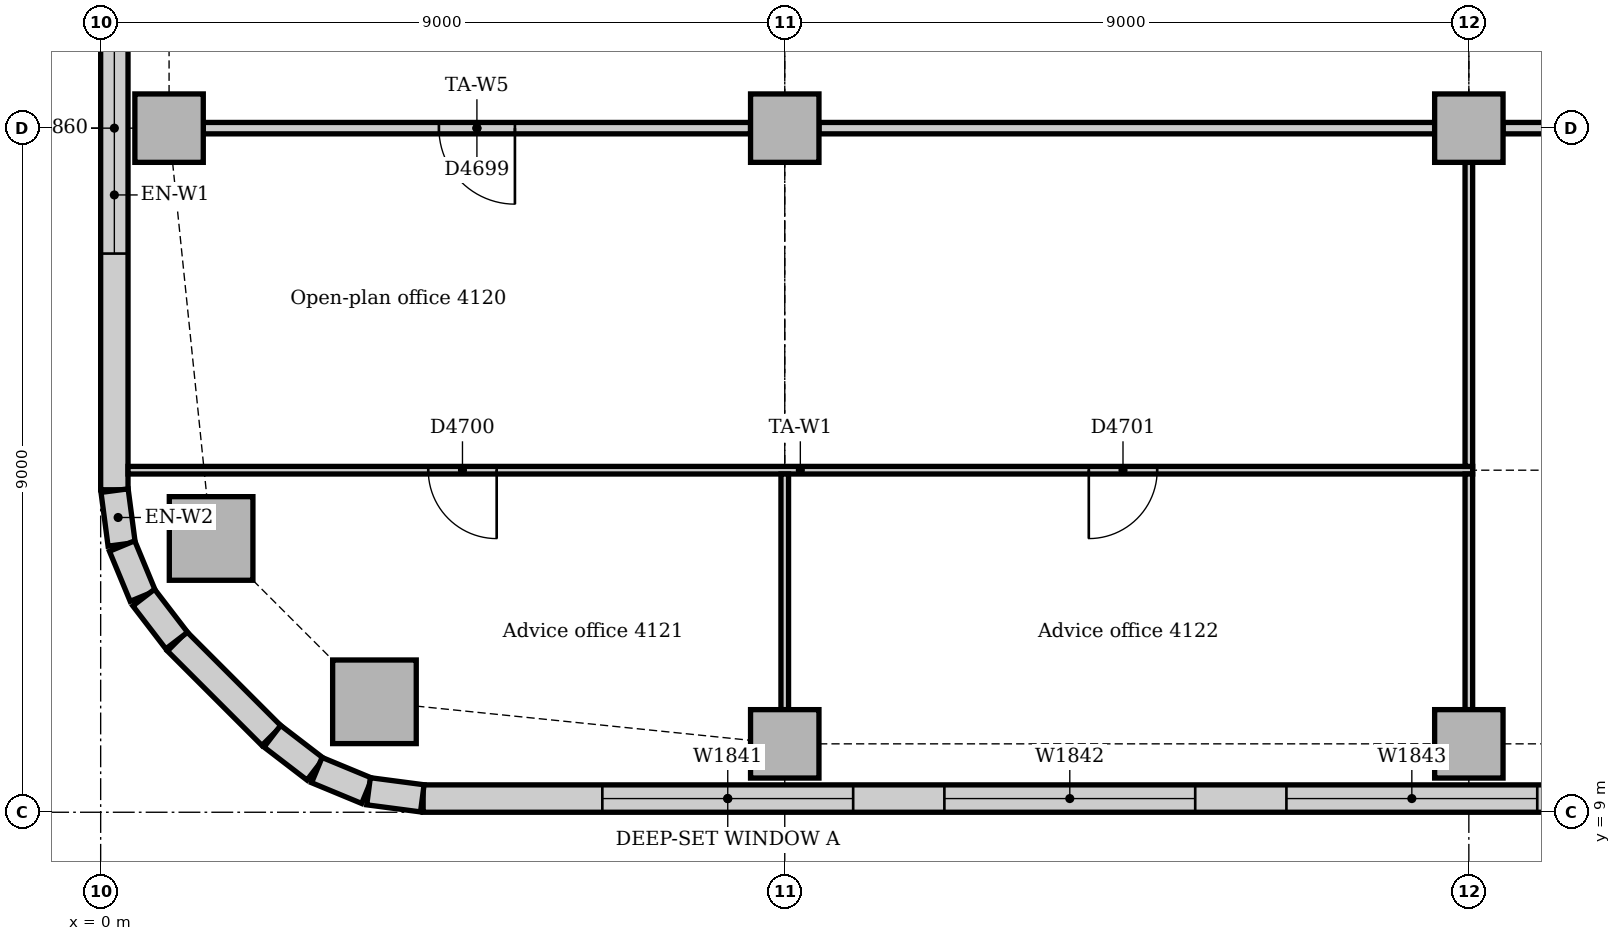
"""IFC4 building model, lengths in metres.
Left out: names, types, materials, properties, quantities, classifications, styles, units other than length and angle.
Written with IfcOpenShell. Run it as: python <this file> out.ifc"""

import sys

from ifc_helpers import new_model, si_unit, direction, frame, frame_2d, origin, origin_2d, place, context, subcontext, project, spatial, rectangle, extrude, element, fill, save


model = new_model("IFC4")
c1 = context("Model", 3, precision=1e-05, world=origin(), true_north=direction((0.0, 1.0)))
c2 = subcontext(c1, "Body", "Model", "MODEL_VIEW")
j1 = project(units=[si_unit("LENGTHUNIT", "METRE"), si_unit("PLANEANGLEUNIT", "RADIAN")], contexts=[c1])
p1 = place(None, origin())
s1 = spatial("IfcSite", under=j1, at=p1, CompositionType="ELEMENT")
p2 = place(p1, origin())
s2 = spatial("IfcBuilding", under=s1, at=p2, CompositionType="ELEMENT")
p3 = place(p2, frame((0.0, 0.0, 173.0)))
s3 = spatial("IfcBuildingStorey", under=s2, at=p3, CompositionType="ELEMENT", Elevation=173.0)
for number, where, z_axis, x_axis in (
    (1, (3.602, 10.453, 0.0), (0.0, 0.0, 1.0), (1.0, 0.0, 0.0)),
    (2, (1.453, 12.602, 0.0), (0.0, 0.0, 1.0), (1.0, 0.0, 0.0)),
):
    element("IfcColumn", number, at=place(p3, frame(where, z_axis=z_axis, x_axis=x_axis)), inside=s3, PredefinedType="COLUMN", context=c2, shape_type="SweptSolid", body=[
        extrude(rectangle(XDim=1.1, YDim=1.1, at=origin_2d()), origin(), (0.0, 0.0, 1.0), 3.85),
    ])
for number, where, z_axis, x_axis in (
    (3, (9.0, 9.9, 0.0), (0.0, 0.0, 1.0), (1.0, 0.0, 0.0)),
    (4, (18.0, 9.9, 0.0), (0.0, 0.0, 1.0), (1.0, 0.0, 0.0)),
    (5, (0.9, 18.0, 0.0), (0.0, 0.0, 1.0), (1.0, 0.0, 0.0)),
    (6, (9.0, 18.0, 0.0), (0.0, 0.0, 1.0), (1.0, 0.0, 0.0)),
    (7, (18.0, 18.0, 0.0), (0.0, 0.0, 1.0), (1.0, 0.0, 0.0)),
):
    element("IfcColumn", number, at=place(p3, frame(where, z_axis=z_axis, x_axis=x_axis)), inside=s3, PredefinedType="COLUMN", context=c2, shape_type="SweptSolid", body=[
        extrude(rectangle(XDim=0.9, YDim=0.9, at=origin_2d()), origin(), (0.0, 0.0, 1.0), 3.85),
    ])
p4 = place(p3, frame((4.243, 9.18, 0.0), z_axis=(0.0, 0.0, 1.0), x_axis=(1.0, 0.0, 0.0)))
e8 = element("IfcWall", 8, at=p4, inside=s3, PredefinedType="STANDARD", context=c2, shape_type="SweptSolid", body=[
    extrude(rectangle(XDim=30.515, YDim=0.36, at=frame_2d((15.257, 0.0))), origin(), (0.0, 0.0, 1.0), 3.85),
])
p5 = place(p4, frame((2.357, 0.0, 0.9)))
e9 = element("IfcOpeningElement", 9, at=p5, cuts=e8, PredefinedType="OPENING", context=c2, shape_type="SweptSolid", body=[
    extrude(rectangle(XDim=3.3, YDim=1.6, at=frame_2d((1.65, 0.8))), frame((0.0, 0.19, 0.0), z_axis=(0.0, -1.0, 0.0), x_axis=(1.0, 0.0, 0.0)), (0.0, 0.0, 1.0), 0.38),
])
p6 = place(p4, frame((6.857, 0.0, 0.9)))
e10 = element("IfcOpeningElement", 10, at=p6, cuts=e8, PredefinedType="OPENING", context=c2, shape_type="SweptSolid", body=[
    extrude(rectangle(XDim=3.3, YDim=1.6, at=frame_2d((1.65, 0.8))), frame((0.0, 0.19, 0.0), z_axis=(0.0, -1.0, 0.0), x_axis=(1.0, 0.0, 0.0)), (0.0, 0.0, 1.0), 0.38),
])
p7 = place(p4, frame((11.357, 0.0, 0.9)))
e11 = element("IfcOpeningElement", 11, at=p7, cuts=e8, PredefinedType="OPENING", context=c2, shape_type="SweptSolid", body=[
    extrude(rectangle(XDim=3.3, YDim=1.6, at=frame_2d((1.65, 0.8))), frame((0.0, 0.19, 0.0), z_axis=(0.0, -1.0, 0.0), x_axis=(1.0, 0.0, 0.0)), (0.0, 0.0, 1.0), 0.38),
])
p8 = place(p4, frame((15.857, 0.0, 0.9)))
e12 = element("IfcOpeningElement", 12, at=p8, cuts=e8, PredefinedType="OPENING", context=c2, shape_type="SweptSolid", body=[
    extrude(rectangle(XDim=3.3, YDim=1.6, at=frame_2d((1.65, 0.8))), frame((0.0, 0.19, 0.0), z_axis=(0.0, -1.0, 0.0), x_axis=(1.0, 0.0, 0.0)), (0.0, 0.0, 1.0), 0.38),
])
p9 = place(p4, frame((20.357, 0.0, 0.9)))
e13 = element("IfcOpeningElement", 13, at=p9, cuts=e8, PredefinedType="OPENING", context=c2, shape_type="SweptSolid", body=[
    extrude(rectangle(XDim=3.3, YDim=1.6, at=frame_2d((1.65, 0.8))), frame((0.0, 0.19, 0.0), z_axis=(0.0, -1.0, 0.0), x_axis=(1.0, 0.0, 0.0)), (0.0, 0.0, 1.0), 0.38),
])
p10 = place(p4, frame((25.307, 0.0, 0.9)))
e14 = element("IfcOpeningElement", 14, at=p10, cuts=e8, PredefinedType="OPENING", context=c2, shape_type="SweptSolid", body=[
    extrude(rectangle(XDim=1.8, YDim=1.6, at=frame_2d((0.9, 0.8))), frame((0.0, 0.19, 0.0), z_axis=(0.0, -1.0, 0.0), x_axis=(1.0, 0.0, 0.0)), (0.0, 0.0, 1.0), 0.38),
])
p11 = place(p3, frame((0.18, 21.0, 0.0), z_axis=(0.0, 0.0, 1.0), x_axis=(0.0, -1.0, 0.0)))
e15 = element("IfcWall", 15, at=p11, inside=s3, PredefinedType="STANDARD", context=c2, shape_type="SweptSolid", body=[
    extrude(rectangle(XDim=7.757, YDim=0.36, at=frame_2d((3.879, 0.0))), origin(), (0.0, 0.0, 1.0), 3.85),
])
p12 = place(p11, frame((1.35, 0.0, 0.9)))
e16 = element("IfcOpeningElement", 16, at=p12, cuts=e15, PredefinedType="OPENING", context=c2, shape_type="SweptSolid", body=[
    extrude(rectangle(XDim=3.3, YDim=1.6, at=frame_2d((1.65, 0.8))), frame((0.0, 0.19, 0.0), z_axis=(0.0, -1.0, 0.0), x_axis=(1.0, 0.0, 0.0)), (0.0, 0.0, 1.0), 0.38),
])
p13 = place(p3, frame((1.006, 11.249, 0.0), z_axis=(0.0, 0.0, 1.0), x_axis=(0.707106781187, -0.707106781187, 0.0)))
e17 = element("IfcWall", 17, at=p13, inside=s3, PredefinedType="STANDARD", context=c2, shape_type="SweptSolid", body=[
    extrude(rectangle(XDim=1.757, YDim=0.36, at=frame_2d((0.879, 0.0))), origin(), (0.0, 0.0, 1.0), 3.85),
])
for number, where, z_axis, x_axis in (
    (18, (0.183, 13.231, 0.0), (0.0, 0.0, 1.0), (0.131, -0.991, 0.0)),
    (19, (0.282, 12.503, 0.0), (0.0, 0.0, 1.0), (0.383, -0.924, 0.0)),
):
    element("IfcWall", number, at=place(p3, frame(where, z_axis=z_axis, x_axis=x_axis)), inside=s3, PredefinedType="STANDARD", context=c2, shape_type="SweptSolid", body=[
        extrude(rectangle(XDim=0.713, YDim=0.36, at=frame_2d((0.356, 0.0))), origin(), (0.0, 0.0, 1.0), 3.85),
    ])
for number, where, z_axis, x_axis in (
    (20, (0.566, 11.825, 0.0), (0.0, 0.0, 1.0), (0.609, -0.793, 0.0)),
    (21, (2.259, 10.0, 0.0), (0.0, 0.0, 1.0), (0.793, -0.609, 0.0)),
):
    element("IfcWall", number, at=place(p3, frame(where, z_axis=z_axis, x_axis=x_axis)), inside=s3, PredefinedType="STANDARD", context=c2, shape_type="SweptSolid", body=[
        extrude(rectangle(XDim=0.713, YDim=0.36, at=frame_2d((0.357, 0.0))), origin(), (0.0, 0.0, 1.0), 3.85),
    ])
for number, where, z_axis, x_axis in (
    (22, (2.844, 9.555, 0.0), (0.0, 0.0, 1.0), (0.924, -0.383, 0.0)),
    (23, (3.524, 9.276, 0.0), (0.0, 0.0, 1.0), (0.991, -0.131, 0.0)),
):
    element("IfcWall", number, at=place(p3, frame(where, z_axis=z_axis, x_axis=x_axis)), inside=s3, PredefinedType="STANDARD", context=c2, shape_type="SweptSolid", body=[
        extrude(rectangle(XDim=0.713, YDim=0.36, at=frame_2d((0.356, 0.0))), origin(), (0.0, 0.0, 1.0), 3.85),
    ])
p14 = place(p3, frame((1.35, 18.0, 0.0), z_axis=(0.0, 0.0, 1.0), x_axis=(1.0, 0.0, 0.0)))
e24 = element("IfcWall", 24, at=p14, inside=s3, PredefinedType="PARTITIONING", context=c2, shape_type="SweptSolid", body=[
    extrude(rectangle(XDim=7.2, YDim=0.15, at=frame_2d((3.6, 0.0))), origin(), (0.0, 0.0, 1.0), 3.262),
])
p15 = place(p14, frame((3.1, 0.0, 0.0)))
e25 = element("IfcOpeningElement", 25, at=p15, cuts=e24, PredefinedType="OPENING", context=c2, shape_type="SweptSolid", body=[
    extrude(rectangle(XDim=1.0, YDim=2.1, at=frame_2d((0.5, 1.05))), frame((0.0, 0.085, 0.0), z_axis=(0.0, -1.0, 0.0), x_axis=(1.0, 0.0, 0.0)), (0.0, 0.0, 1.0), 0.17),
])
p16 = place(p3, frame((9.45, 18.0, 0.0), z_axis=(0.0, 0.0, 1.0), x_axis=(1.0, 0.0, 0.0)))
e26 = element("IfcWall", 26, at=p16, inside=s3, PredefinedType="PARTITIONING", context=c2, shape_type="SweptSolid", body=[
    extrude(rectangle(XDim=8.1, YDim=0.15, at=frame_2d((4.05, 0.0))), origin(), (0.0, 0.0, 1.0), 3.262),
])
p17 = place(p3, frame((18.45, 18.0, 0.0), z_axis=(0.0, 0.0, 1.0), x_axis=(1.0, 0.0, 0.0)))
e27 = element("IfcWall", 27, at=p17, inside=s3, PredefinedType="PARTITIONING", context=c2, shape_type="SweptSolid", body=[
    extrude(rectangle(XDim=8.1, YDim=0.15, at=frame_2d((4.05, 0.0))), origin(), (0.0, 0.0, 1.0), 3.262),
])
p18 = place(p17, frame((3.6, 0.0, 0.0)))
e28 = element("IfcOpeningElement", 28, at=p18, cuts=e27, PredefinedType="OPENING", context=c2, shape_type="SweptSolid", body=[
    extrude(rectangle(XDim=0.9, YDim=2.1, at=frame_2d((0.45, 1.05))), frame((0.0, 0.085, 0.0), z_axis=(0.0, -1.0, 0.0), x_axis=(1.0, 0.0, 0.0)), (0.0, 0.0, 1.0), 0.17),
])
p19 = place(p3, frame((0.36, 13.5, 0.0), z_axis=(0.0, 0.0, 1.0), x_axis=(1.0, 0.0, 0.0)))
e29 = element("IfcWall", 29, at=p19, inside=s3, PredefinedType="PARTITIONING", context=c2, shape_type="SweptSolid", body=[
    extrude(rectangle(XDim=17.69, YDim=0.1, at=frame_2d((8.845, 0.0))), origin(), (0.0, 0.0, 1.0), 3.4),
])
p20 = place(p19, frame((3.95, 0.0, 0.0)))
e30 = element("IfcOpeningElement", 30, at=p20, cuts=e29, PredefinedType="OPENING", context=c2, shape_type="SweptSolid", body=[
    extrude(rectangle(XDim=0.9, YDim=2.1, at=frame_2d((0.45, 1.05))), frame((0.0, 0.06, 0.0), z_axis=(0.0, -1.0, 0.0), x_axis=(1.0, 0.0, 0.0)), (0.0, 0.0, 1.0), 0.12),
])
p21 = place(p19, frame((12.64, 0.0, 0.0)))
e31 = element("IfcOpeningElement", 31, at=p21, cuts=e29, PredefinedType="OPENING", context=c2, shape_type="SweptSolid", body=[
    extrude(rectangle(XDim=0.9, YDim=2.1, at=frame_2d((0.45, 1.05))), frame((0.0, 0.06, 0.0), z_axis=(0.0, -1.0, 0.0), x_axis=(1.0, 0.0, 0.0)), (0.0, 0.0, 1.0), 0.12),
])
p22 = place(p3, frame((18.0, 10.35, 0.0), z_axis=(0.0, 0.0, 1.0), x_axis=(0.0, 1.0, 0.0)))
e32 = element("IfcWall", 32, at=p22, inside=s3, PredefinedType="PARTITIONING", context=c2, shape_type="SweptSolid", body=[
    extrude(rectangle(XDim=3.1, YDim=0.1, at=frame_2d((1.55, 0.0))), origin(), (0.0, 0.0, 1.0), 3.362),
])
p23 = place(p3, frame((18.0, 13.55, 0.0), z_axis=(0.0, 0.0, 1.0), x_axis=(0.0, 1.0, 0.0)))
e33 = element("IfcWall", 33, at=p23, inside=s3, PredefinedType="PARTITIONING", context=c2, shape_type="SweptSolid", body=[
    extrude(rectangle(XDim=4.0, YDim=0.1, at=frame_2d((2.0, 0.0))), origin(), (0.0, 0.0, 1.0), 3.362),
])
p24 = place(p3, frame((9.0, 10.35, 0.0), z_axis=(0.0, 0.0, 1.0), x_axis=(0.0, 1.0, 0.0)))
e34 = element("IfcWall", 34, at=p24, inside=s3, PredefinedType="PARTITIONING", context=c2, shape_type="SweptSolid", body=[
    extrude(rectangle(XDim=3.1, YDim=0.1, at=frame_2d((1.55, 0.0))), origin(), (0.0, 0.0, 1.0), 3.362),
])
p25 = place(p5, origin())
e35 = element("IfcWindow", 35, at=p25, inside=s3, PartitioningType="SINGLE_PANEL", PredefinedType="WINDOW", context=c2, shape_type="SweptSolid", body=[
    extrude(rectangle(XDim=3.3, YDim=1.6, at=frame_2d((1.65, 0.8))), frame((0.0, 0.13, 0.0), z_axis=(0.0, -1.0, 0.0), x_axis=(1.0, 0.0, 0.0)), (0.0, 0.0, 1.0), 0.06),
])
fill(e9, e35)
p26 = place(p6, origin())
e36 = element("IfcWindow", 36, at=p26, inside=s3, PartitioningType="SINGLE_PANEL", PredefinedType="WINDOW", context=c2, shape_type="SweptSolid", body=[
    extrude(rectangle(XDim=3.3, YDim=1.6, at=frame_2d((1.65, 0.8))), frame((0.0, 0.13, 0.0), z_axis=(0.0, -1.0, 0.0), x_axis=(1.0, 0.0, 0.0)), (0.0, 0.0, 1.0), 0.06),
])
fill(e10, e36)
p27 = place(p7, origin())
e37 = element("IfcWindow", 37, at=p27, inside=s3, PartitioningType="SINGLE_PANEL", PredefinedType="WINDOW", context=c2, shape_type="SweptSolid", body=[
    extrude(rectangle(XDim=3.3, YDim=1.6, at=frame_2d((1.65, 0.8))), frame((0.0, 0.13, 0.0), z_axis=(0.0, -1.0, 0.0), x_axis=(1.0, 0.0, 0.0)), (0.0, 0.0, 1.0), 0.06),
])
fill(e11, e37)
p28 = place(p12, origin())
e38 = element("IfcWindow", 38, at=p28, inside=s3, PartitioningType="SINGLE_PANEL", PredefinedType="WINDOW", context=c2, shape_type="SweptSolid", body=[
    extrude(rectangle(XDim=3.3, YDim=1.6, at=frame_2d((1.65, 0.8))), frame((0.0, 0.13, 0.0), z_axis=(0.0, -1.0, 0.0), x_axis=(1.0, 0.0, 0.0)), (0.0, 0.0, 1.0), 0.06),
])
fill(e16, e38)
p29 = place(p15, frame((1.0, 0.0, 0.0), z_axis=(0.0, 0.0, 1.0), x_axis=(-1.0, 0.0, 0.0)))
e39 = element("IfcDoor", 39, at=p29, inside=s3, OperationType="SINGLE_SWING_LEFT", PredefinedType="DOOR", context=c2, shape_type="SweptSolid", body=[
    extrude(rectangle(XDim=1.0, YDim=2.1, at=frame_2d((0.5, 1.05))), frame((0.0, 0.025, 0.0), z_axis=(0.0, -1.0, 0.0), x_axis=(1.0, 0.0, 0.0)), (0.0, 0.0, 1.0), 0.05),
])
fill(e25, e39)
p30 = place(p20, frame((0.9, 0.0, 0.0), z_axis=(0.0, 0.0, 1.0), x_axis=(-1.0, 0.0, 0.0)))
e40 = element("IfcDoor", 40, at=p30, inside=s3, OperationType="SINGLE_SWING_LEFT", PredefinedType="DOOR", context=c2, shape_type="SweptSolid", body=[
    extrude(rectangle(XDim=0.9, YDim=2.1, at=frame_2d((0.45, 1.05))), frame((0.0, 0.025, 0.0), z_axis=(0.0, -1.0, 0.0), x_axis=(1.0, 0.0, 0.0)), (0.0, 0.0, 1.0), 0.05),
])
fill(e30, e40)
p31 = place(p21, frame((0.9, 0.0, 0.0), z_axis=(0.0, 0.0, 1.0), x_axis=(-1.0, 0.0, 0.0)))
e41 = element("IfcDoor", 41, at=p31, inside=s3, OperationType="SINGLE_SWING_RIGHT", PredefinedType="DOOR", context=c2, shape_type="SweptSolid", body=[
    extrude(rectangle(XDim=0.9, YDim=2.1, at=frame_2d((0.45, 1.05))), frame((0.0, 0.025, 0.0), z_axis=(0.0, -1.0, 0.0), x_axis=(1.0, 0.0, 0.0)), (0.0, 0.0, 1.0), 0.05),
])
fill(e31, e41)
save(model, sys.argv[1])
